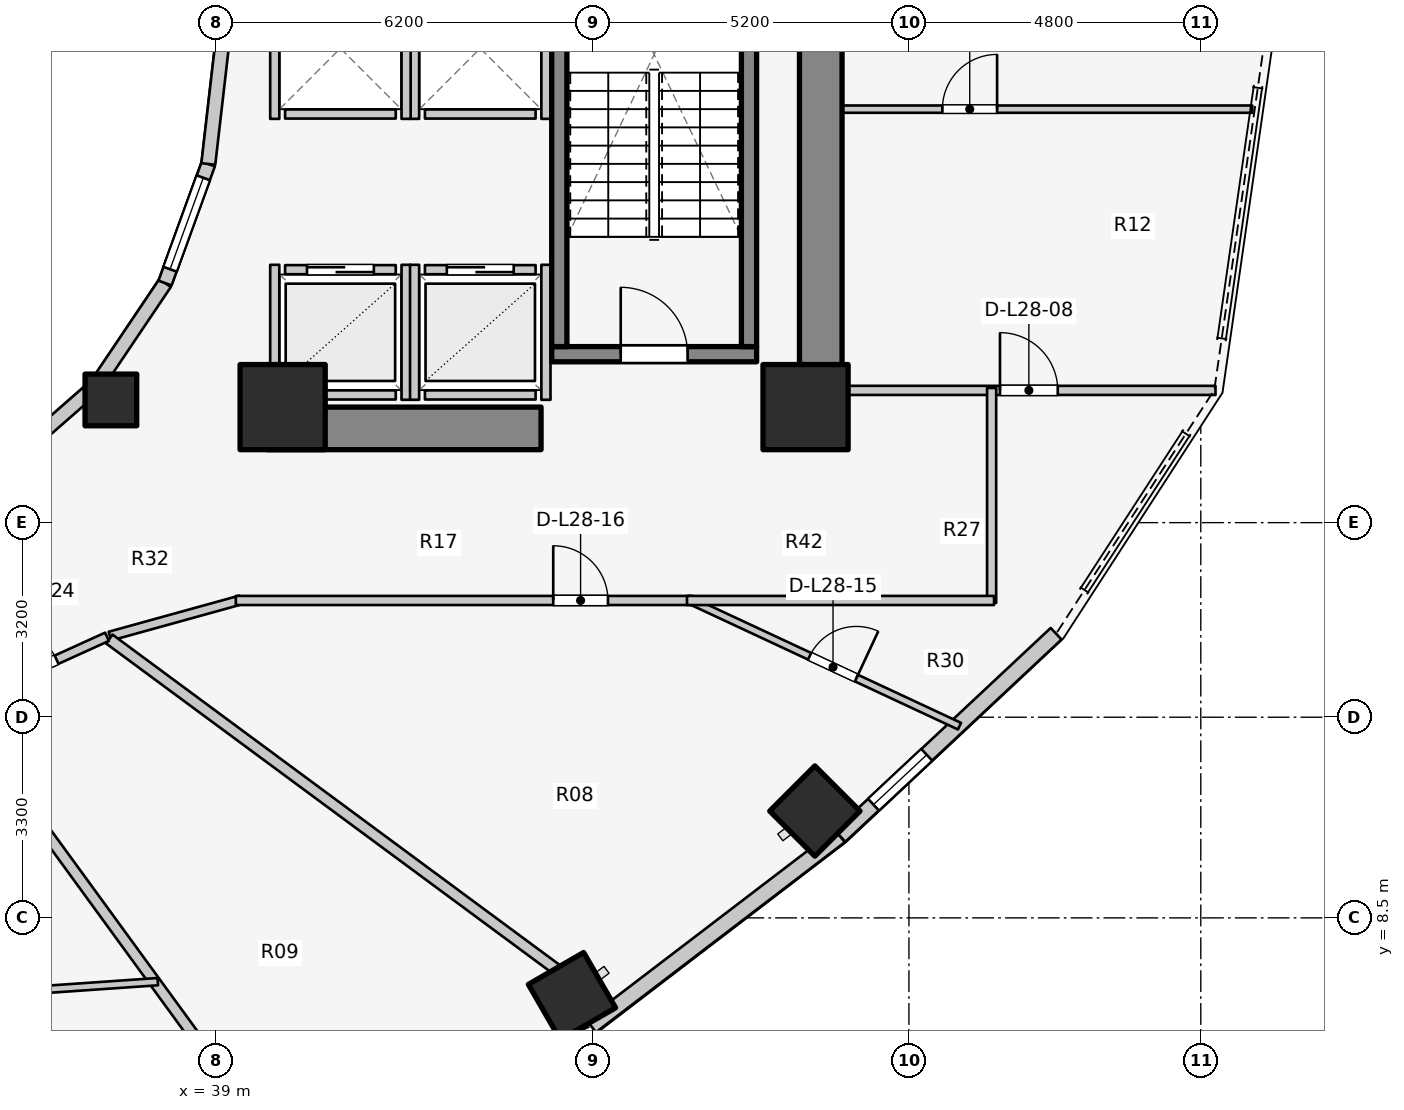
"""IFC4 building model, lengths in metres.
Left out: names, types, materials, properties, quantities, classifications, styles, units other than length and angle.
Written with IfcOpenShell. Run it as: python <this file> out.ifc"""

import sys

from ifc_helpers import new_model, si_unit, direction, frame, frame_2d, origin, origin_2d, place, context, subcontext, project, spatial, rectangle, extrude, element, fill, save


model = new_model("IFC4")
c1 = context("Model", 3, precision=1e-05, world=origin(), true_north=direction((0.0, 1.0)))
c2 = subcontext(c1, "Body", "Model", "MODEL_VIEW")
j1 = project(units=[si_unit("LENGTHUNIT", "METRE"), si_unit("PLANEANGLEUNIT", "RADIAN")], contexts=[c1])
p1 = place(None, origin())
s1 = spatial("IfcSite", under=j1, at=p1, CompositionType="ELEMENT")
p2 = place(p1, origin())
s2 = spatial("IfcBuilding", under=s1, at=p2, CompositionType="ELEMENT")
p3 = place(p2, frame((0.0, 0.0, 94.9)))
s3 = spatial("IfcBuildingStorey", under=s2, at=p3, CompositionType="ELEMENT", Elevation=94.9)
p4 = place(p3, frame((48.95, 17.05, 0.0), z_axis=(0.0, 0.0, 1.0), x_axis=(0.0, 1.0, 0.0)))
e1 = element("IfcWall", 1, at=p4, inside=s3, PredefinedType="SHEAR", context=c2, shape_type="SweptSolid", body=[
    extrude(rectangle(XDim=12.8, YDim=0.7, at=frame_2d((6.4, 0.0))), origin(), (0.0, 0.0, 1.0), 3.1),
])
p5 = place(p3, frame((39.85, 16.55, 0.0), z_axis=(0.0, 0.0, 1.0), x_axis=(1.0, 0.0, 0.0)))
e2 = element("IfcWall", 2, at=p5, inside=s3, PredefinedType="SHEAR", context=c2, shape_type="SweptSolid", body=[
    extrude(rectangle(XDim=4.5, YDim=0.7, at=frame_2d((2.25, 0.0))), origin(), (0.0, 0.0, 1.0), 3.1),
])
p6 = place(p3, frame((44.525, 17.77, 0.0), z_axis=(0.0, 0.0, 1.0), x_axis=(1.0, 0.0, 0.0)))
e3 = element("IfcWall", 3, at=p6, inside=s3, PredefinedType="SOLIDWALL", context=c2, shape_type="SweptSolid", body=[
    extrude(rectangle(XDim=3.37, YDim=0.25, at=frame_2d((1.685, 0.0))), origin(), (0.0, 0.0, 1.0), 3.1),
])
p7 = place(p6, frame((1.135, 0.0, 0.0)))
e4 = element("IfcOpeningElement", 4, at=p7, cuts=e3, PredefinedType="OPENING", context=c2, shape_type="SweptSolid", body=[
    extrude(rectangle(XDim=1.1, YDim=2.1, at=frame_2d((0.55, 1.05))), frame((0.0, 0.135, 0.0), z_axis=(0.0, -1.0, 0.0), x_axis=(1.0, 0.0, 0.0)), (0.0, 0.0, 1.0), 0.27),
])
for number, where, z_axis, x_axis in (
    (5, (44.65, 17.895, 0.0), (0.0, 0.0, 1.0), (0.0, 1.0, 0.0)),
    (6, (47.77, 17.895, 0.0), (0.0, 0.0, 1.0), (0.0, 1.0, 0.0)),
):
    element("IfcWall", number, at=place(p3, frame(where, z_axis=z_axis, x_axis=x_axis)), inside=s3, PredefinedType="SOLIDWALL", context=c2, shape_type="SweptSolid", body=[
        extrude(rectangle(XDim=7.81, YDim=0.25, at=frame_2d((3.905, 0.0))), origin(), (0.0, 0.0, 1.0), 3.1),
    ])
for number, where, z_axis, x_axis in (
    (7, (40.1, 16.9, 0.0), (0.0, 0.0, 1.0), (1.0, 0.0, 0.0)),
    (8, (48.7, 16.9, 0.0), (0.0, 0.0, 1.0), (1.0, 0.0, 0.0)),
):
    element("IfcColumn", number, at=place(p3, frame(where, z_axis=z_axis, x_axis=x_axis)), inside=s3, PredefinedType="COLUMN", context=c2, shape_type="SweptSolid", body=[
        extrude(rectangle(XDim=1.4, YDim=1.4, at=origin_2d()), origin(), (0.0, 0.0, 1.0), 3.1),
    ])
p8 = place(p3, frame((44.858, 7.214, 0.0), z_axis=(0.0, 0.0, 1.0), x_axis=(0.5, -0.866025403784, 0.0)))
e9 = element("IfcColumn", 9, at=p8, inside=s3, PredefinedType="COLUMN", context=c2, shape_type="SweptSolid", body=[
    extrude(rectangle(XDim=1.05, YDim=1.05, at=origin_2d()), origin(), (0.0, 0.0, 1.0), 3.1),
])
p9 = place(p3, frame((37.275, 17.018, 0.0), z_axis=(0.0, 0.0, 1.0), x_axis=(1.0, 0.0, 0.0)))
e10 = element("IfcColumn", 10, at=p9, inside=s3, PredefinedType="COLUMN", context=c2, shape_type="SweptSolid", body=[
    extrude(rectangle(XDim=0.85, YDim=0.85, at=origin_2d()), origin(), (0.0, 0.0, 1.0), 3.1),
])
p10 = place(p3, frame((48.853, 10.257, 0.0), z_axis=(0.0, 0.0, 1.0), x_axis=(0.707106781187, -0.707106781187, 0.0)))
e11 = element("IfcColumn", 11, at=p10, inside=s3, PredefinedType="COLUMN", context=c2, shape_type="SweptSolid", body=[
    extrude(rectangle(XDim=1.05, YDim=1.05, at=origin_2d()), origin(), (0.0, 0.0, 1.0), 3.1),
])
p11 = place(p3, frame((35.56, 15.968, 0.0), z_axis=(0.0, 0.0, 1.0), x_axis=(0.752576694707, 0.658504607869, 0.0)))
e12 = element("IfcWall", 12, at=p11, inside=s3, PredefinedType="STANDARD", context=c2, shape_type="SweptSolid", body=[
    extrude(rectangle(XDim=1.959, YDim=0.23, at=frame_2d((0.98, 0.0))), origin(), (0.0, 0.0, 1.0), 2.16),
])
p12 = place(p3, frame((37.035, 17.258, 0.0), z_axis=(0.0, 0.0, 1.0), x_axis=(0.558197800898, 0.829707909492, 0.0)))
e13 = element("IfcWall", 13, at=p12, inside=s3, PredefinedType="STANDARD", context=c2, shape_type="SweptSolid", body=[
    extrude(rectangle(XDim=2.027, YDim=0.23, at=frame_2d((1.013, 0.0))), origin(), (0.0, 0.0, 1.0), 2.16),
])
p13 = place(p3, frame((38.166, 18.94, 0.0), z_axis=(0.0, 0.0, 1.0), x_axis=(0.341423187295, 0.93990968033, 0.0)))
e14 = element("IfcWall", 14, at=p13, inside=s3, PredefinedType="STANDARD", context=c2, shape_type="SweptSolid", body=[
    extrude(rectangle(XDim=2.084, YDim=0.23, at=frame_2d((1.042, 0.0))), origin(), (0.0, 0.0, 1.0), 2.84),
])
p14 = place(p13, frame((0.242, 0.0, 0.85)))
e15 = element("IfcOpeningElement", 15, at=p14, cuts=e14, PredefinedType="OPENING", context=c2, shape_type="SweptSolid", body=[
    extrude(rectangle(XDim=1.6, YDim=1.65, at=frame_2d((0.8, 0.825))), frame((0.0, 0.125, 0.0), z_axis=(0.0, -1.0, 0.0), x_axis=(1.0, 0.0, 0.0)), (0.0, 0.0, 1.0), 0.25),
])
p15 = place(p3, frame((38.877, 20.898, 0.0), z_axis=(0.0, 0.0, 1.0), x_axis=(0.114711713601, 0.993398823617, 0.0)))
e16 = element("IfcWall", 16, at=p15, inside=s3, PredefinedType="STANDARD", context=c2, shape_type="SweptSolid", body=[
    extrude(rectangle(XDim=2.115, YDim=0.23, at=frame_2d((1.058, 0.0))), origin(), (0.0, 0.0, 1.0), 2.84),
])
p16 = place(p3, frame((45.173, 6.722, 0.0), z_axis=(0.0, 0.0, 1.0), x_axis=(0.794809810864, 0.606858603427, 0.0)))
e17 = element("IfcWall", 17, at=p16, inside=s3, PredefinedType="STANDARD", context=c2, shape_type="SweptSolid", body=[
    extrude(rectangle(XDim=5.149, YDim=0.26, at=frame_2d((2.575, 0.0))), origin(), (0.0, 0.0, 1.0), 2.85),
])
p17 = place(p3, frame((49.266, 9.847, 0.0), z_axis=(0.0, 0.0, 1.0), x_axis=(0.730162452258, 0.68327358599, 0.0)))
e18 = element("IfcWall", 18, at=p17, inside=s3, PredefinedType="STANDARD", context=c2, shape_type="SweptSolid", body=[
    extrude(rectangle(XDim=4.868, YDim=0.26, at=frame_2d((2.434, 0.0))), origin(), (0.0, 0.0, 1.0), 2.85),
])
p18 = place(p17, frame((0.755, 0.0, 0.75)))
e19 = element("IfcOpeningElement", 19, at=p18, cuts=e18, PredefinedType="OPENING", context=c2, shape_type="SweptSolid", body=[
    extrude(rectangle(XDim=1.2, YDim=1.5, at=frame_2d((0.6, 0.75))), frame((0.0, 0.14, 0.0), z_axis=(0.0, -1.0, 0.0), x_axis=(1.0, 0.0, 0.0)), (0.0, 0.0, 1.0), 0.28),
])
p19 = place(p3, frame((40.14, 19.16, 0.0), z_axis=(0.0, 0.0, 1.0), x_axis=(1.0, 0.0, 0.0)))
e20 = element("IfcWall", 20, at=p19, inside=s3, PredefinedType="SOLIDWALL", context=c2, shape_type="SweptSolid", body=[
    extrude(rectangle(XDim=1.82, YDim=0.15, at=frame_2d((0.91, 0.0))), origin(), (0.0, 0.0, 1.0), 2.12),
])
p20 = place(p19, frame((0.36, 0.0, 0.0)))
e21 = element("IfcOpeningElement", 21, at=p20, cuts=e20, PredefinedType="OPENING", context=c2, shape_type="SweptSolid", body=[
    extrude(rectangle(XDim=1.1, YDim=2.1, at=frame_2d((0.55, 1.05))), frame((0.0, 0.085, 0.0), z_axis=(0.0, -1.0, 0.0), x_axis=(1.0, 0.0, 0.0)), (0.0, 0.0, 1.0), 0.17),
])
p21 = place(p3, frame((40.14, 17.1, 0.0), z_axis=(0.0, 0.0, 1.0), x_axis=(1.0, 0.0, 0.0)))
e22 = element("IfcWall", 22, at=p21, inside=s3, PredefinedType="SOLIDWALL", context=c2, shape_type="SweptSolid", body=[
    extrude(rectangle(XDim=1.82, YDim=0.15, at=frame_2d((0.91, 0.0))), origin(), (0.0, 0.0, 1.0), 2.12),
])
p22 = place(p3, frame((39.97, 17.02, 0.0), z_axis=(0.0, 0.0, 1.0), x_axis=(0.0, 1.0, 0.0)))
e23 = element("IfcWall", 23, at=p22, inside=s3, PredefinedType="SOLIDWALL", context=c2, shape_type="SweptSolid", body=[
    extrude(rectangle(XDim=2.22, YDim=0.15, at=frame_2d((1.11, 0.0))), origin(), (0.0, 0.0, 1.0), 2.12),
])
p23 = place(p3, frame((42.13, 17.02, 0.0), z_axis=(0.0, 0.0, 1.0), x_axis=(0.0, 1.0, 0.0)))
e24 = element("IfcWall", 24, at=p23, inside=s3, PredefinedType="SOLIDWALL", context=c2, shape_type="SweptSolid", body=[
    extrude(rectangle(XDim=2.22, YDim=0.15, at=frame_2d((1.11, 0.0))), origin(), (0.0, 0.0, 1.0), 2.855),
])
p24 = place(p3, frame((42.44, 19.16, 0.0), z_axis=(0.0, 0.0, 1.0), x_axis=(1.0, 0.0, 0.0)))
e25 = element("IfcWall", 25, at=p24, inside=s3, PredefinedType="SOLIDWALL", context=c2, shape_type="SweptSolid", body=[
    extrude(rectangle(XDim=1.82, YDim=0.15, at=frame_2d((0.91, 0.0))), origin(), (0.0, 0.0, 1.0), 2.855),
])
p25 = place(p24, frame((0.36, 0.0, 0.0)))
e26 = element("IfcOpeningElement", 26, at=p25, cuts=e25, PredefinedType="OPENING", context=c2, shape_type="SweptSolid", body=[
    extrude(rectangle(XDim=1.1, YDim=2.1, at=frame_2d((0.55, 1.05))), frame((0.0, 0.085, 0.0), z_axis=(0.0, -1.0, 0.0), x_axis=(1.0, 0.0, 0.0)), (0.0, 0.0, 1.0), 0.17),
])
p26 = place(p3, frame((42.44, 17.1, 0.0), z_axis=(0.0, 0.0, 1.0), x_axis=(1.0, 0.0, 0.0)))
e27 = element("IfcWall", 27, at=p26, inside=s3, PredefinedType="SOLIDWALL", context=c2, shape_type="SweptSolid", body=[
    extrude(rectangle(XDim=1.82, YDim=0.15, at=frame_2d((0.91, 0.0))), origin(), (0.0, 0.0, 1.0), 2.855),
])
p27 = place(p3, frame((42.27, 17.02, 0.0), z_axis=(0.0, 0.0, 1.0), x_axis=(0.0, 1.0, 0.0)))
e28 = element("IfcWall", 28, at=p27, inside=s3, PredefinedType="SOLIDWALL", context=c2, shape_type="SweptSolid", body=[
    extrude(rectangle(XDim=2.22, YDim=0.15, at=frame_2d((1.11, 0.0))), origin(), (0.0, 0.0, 1.0), 2.855),
])
p28 = place(p3, frame((44.43, 17.02, 0.0), z_axis=(0.0, 0.0, 1.0), x_axis=(0.0, 1.0, 0.0)))
e29 = element("IfcWall", 29, at=p28, inside=s3, PredefinedType="SOLIDWALL", context=c2, shape_type="SweptSolid", body=[
    extrude(rectangle(XDim=2.22, YDim=0.15, at=frame_2d((1.11, 0.0))), origin(), (0.0, 0.0, 1.0), 2.12),
])
p29 = place(p3, frame((42.44, 21.72, 0.0), z_axis=(0.0, 0.0, 1.0), x_axis=(1.0, 0.0, 0.0)))
e30 = element("IfcWall", 30, at=p29, inside=s3, PredefinedType="SOLIDWALL", context=c2, shape_type="SweptSolid", body=[
    extrude(rectangle(XDim=1.82, YDim=0.15, at=frame_2d((0.91, 0.0))), origin(), (0.0, 0.0, 1.0), 2.855),
])
for number, where, z_axis, x_axis in (
    (31, (42.27, 21.64, 0.0), (0.0, 0.0, 1.0), (0.0, 1.0, 0.0)),
    (32, (44.43, 21.64, 0.0), (0.0, 0.0, 1.0), (0.0, 1.0, 0.0)),
):
    element("IfcWall", number, at=place(p3, frame(where, z_axis=z_axis, x_axis=x_axis)), inside=s3, PredefinedType="SOLIDWALL", context=c2, shape_type="SweptSolid", body=[
        extrude(rectangle(XDim=2.32, YDim=0.15, at=frame_2d((1.16, 0.0))), origin(), (0.0, 0.0, 1.0), 2.855),
    ])
p30 = place(p3, frame((40.14, 21.72, 0.0), z_axis=(0.0, 0.0, 1.0), x_axis=(1.0, 0.0, 0.0)))
e33 = element("IfcWall", 33, at=p30, inside=s3, PredefinedType="SOLIDWALL", context=c2, shape_type="SweptSolid", body=[
    extrude(rectangle(XDim=1.82, YDim=0.15, at=frame_2d((0.91, 0.0))), origin(), (0.0, 0.0, 1.0), 2.12),
])
p31 = place(p3, frame((39.97, 21.64, 0.0), z_axis=(0.0, 0.0, 1.0), x_axis=(0.0, 1.0, 0.0)))
e34 = element("IfcWall", 34, at=p31, inside=s3, PredefinedType="SOLIDWALL", context=c2, shape_type="SweptSolid", body=[
    extrude(rectangle(XDim=2.32, YDim=0.15, at=frame_2d((1.16, 0.0))), origin(), (0.0, 0.0, 1.0), 2.12),
])
p32 = place(p3, frame((42.13, 21.64, 0.0), z_axis=(0.0, 0.0, 1.0), x_axis=(0.0, 1.0, 0.0)))
e35 = element("IfcWall", 35, at=p32, inside=s3, PredefinedType="SOLIDWALL", context=c2, shape_type="SweptSolid", body=[
    extrude(rectangle(XDim=2.32, YDim=0.15, at=frame_2d((1.16, 0.0))), origin(), (0.0, 0.0, 1.0), 2.855),
])
p33 = place(p3, frame((48.95, 17.175, 0.0), z_axis=(0.0, 0.0, 1.0), x_axis=(1.0, 0.0, 0.0)))
e36 = element("IfcWall", 36, at=p33, inside=s3, PredefinedType="PARTITIONING", context=c2, shape_type="SweptSolid", body=[
    extrude(rectangle(XDim=6.492, YDim=0.15, at=frame_2d((3.246, 0.0))), origin(), (0.0, 0.0, 1.0), 2.855),
])
p34 = place(p33, frame((2.948, 0.0, 0.0)))
e37 = element("IfcOpeningElement", 37, at=p34, cuts=e36, PredefinedType="OPENING", context=c2, shape_type="SweptSolid", body=[
    extrude(rectangle(XDim=0.95, YDim=2.1, at=frame_2d((0.475, 1.05))), frame((0.0, 0.085, 0.0), z_axis=(0.0, -1.0, 0.0), x_axis=(1.0, 0.0, 0.0)), (0.0, 0.0, 1.0), 0.17),
])
p35 = place(p3, frame((48.95, 21.8, 0.0), z_axis=(0.0, 0.0, 1.0), x_axis=(1.0, 0.0, 0.0)))
e38 = element("IfcWall", 38, at=p35, inside=s3, PredefinedType="MOVABLE", context=c2, shape_type="SweptSolid", body=[
    extrude(rectangle(XDim=7.097, YDim=0.12, at=frame_2d((3.549, 0.0))), origin(), (0.0, 0.0, 1.0), 2.855),
])
p36 = place(p35, frame((2.0, 0.0, 0.0)))
e39 = element("IfcOpeningElement", 39, at=p36, cuts=e38, PredefinedType="OPENING", context=c2, shape_type="SweptSolid", body=[
    extrude(rectangle(XDim=0.9, YDim=2.1, at=frame_2d((0.45, 1.05))), frame((0.0, 0.07, 0.0), z_axis=(0.0, -1.0, 0.0), x_axis=(1.0, 0.0, 0.0)), (0.0, 0.0, 1.0), 0.14),
])
p37 = place(p3, frame((51.76, 13.68, 0.0), z_axis=(0.0, 0.0, 1.0), x_axis=(0.0, 1.0, 0.0)))
e40 = element("IfcWall", 40, at=p37, inside=s3, PredefinedType="PARTITIONING", context=c2, shape_type="SweptSolid", body=[
    extrude(rectangle(XDim=3.535, YDim=0.15, at=frame_2d((1.768, 0.0))), origin(), (0.0, 0.0, 1.0), 2.855),
])
p38 = place(p3, frame((46.755, 13.741, 0.0), z_axis=(0.0, 0.0, 1.0), x_axis=(0.906244997559, -0.422752888102, 0.0)))
e41 = element("IfcWall", 41, at=p38, inside=s3, PredefinedType="MOVABLE", context=c2, shape_type="SweptSolid", body=[
    extrude(rectangle(XDim=4.94, YDim=0.12, at=frame_2d((2.47, 0.0))), origin(), (0.0, 0.0, 1.0), 2.142),
])
p39 = place(p38, frame((2.22, 0.0, 0.0)))
e42 = element("IfcOpeningElement", 42, at=p39, cuts=e41, PredefinedType="OPENING", context=c2, shape_type="SweptSolid", body=[
    extrude(rectangle(XDim=0.85, YDim=2.05, at=frame_2d((0.425, 1.025))), frame((0.0, 0.07, 0.0), z_axis=(0.0, -1.0, 0.0), x_axis=(1.0, 0.0, 0.0)), (0.0, 0.0, 1.0), 0.14),
])
p40 = place(p3, frame((37.258, 13.133, 0.0), z_axis=(0.0, 0.0, 1.0), x_axis=(0.963833843713, 0.266503886865, 0.0)))
e43 = element("IfcWall", 43, at=p40, inside=s3, PredefinedType="PARTITIONING", context=c2, shape_type="SweptSolid", body=[
    extrude(rectangle(XDim=2.232, YDim=0.15, at=frame_2d((1.116, 0.0))), origin(), (0.0, 0.0, 1.0), 2.272),
])
p41 = place(p3, frame((39.33, 13.72, 0.0), z_axis=(0.0, 0.0, 1.0), x_axis=(1.0, 0.0, 0.0)))
e44 = element("IfcWall", 44, at=p41, inside=s3, PredefinedType="PARTITIONING", context=c2, shape_type="SweptSolid", body=[
    extrude(rectangle(XDim=7.52, YDim=0.15, at=frame_2d((3.76, 0.0))), origin(), (0.0, 0.0, 1.0), 2.272),
])
p42 = place(p41, frame((5.22, 0.0, 0.0)))
e45 = element("IfcOpeningElement", 45, at=p42, cuts=e44, PredefinedType="OPENING", context=c2, shape_type="SweptSolid", body=[
    extrude(rectangle(XDim=0.9, YDim=2.1, at=frame_2d((0.45, 1.05))), frame((0.0, 0.085, 0.0), z_axis=(0.0, -1.0, 0.0), x_axis=(1.0, 0.0, 0.0)), (0.0, 0.0, 1.0), 0.17),
])
p43 = place(p3, frame((46.75, 13.72, 0.0), z_axis=(0.0, 0.0, 1.0), x_axis=(1.0, 0.0, 0.0)))
e46 = element("IfcWall", 46, at=p43, inside=s3, PredefinedType="PARTITIONING", context=c2, shape_type="SweptSolid", body=[
    extrude(rectangle(XDim=5.05, YDim=0.15, at=frame_2d((2.525, 0.0))), origin(), (0.0, 0.0, 1.0), 2.142),
])
p44 = place(p3, frame((34.727, 11.934, 0.0), z_axis=(0.0, 0.0, 1.0), x_axis=(0.589042211476, -0.808102266486, 0.0)))
e47 = element("IfcWall", 47, at=p44, inside=s3, PredefinedType="PARTITIONING", context=c2, shape_type="SweptSolid", body=[
    extrude(rectangle(XDim=8.101, YDim=0.18, at=frame_2d((4.051, 0.0))), origin(), (0.0, 0.0, 1.0), 2.272),
])
p45 = place(p3, frame((37.249, 13.086, 0.0), z_axis=(0.0, 0.0, 1.0), x_axis=(0.80430981394, -0.594210167533, 0.0)))
e48 = element("IfcWall", 48, at=p45, inside=s3, PredefinedType="PARTITIONING", context=c2, shape_type="SweptSolid", body=[
    extrude(rectangle(XDim=9.146, YDim=0.18, at=frame_2d((4.573, 0.0))), origin(), (0.0, 0.0, 1.0), 2.272),
])
p46 = place(p3, frame((31.99, 7.032, 0.0), z_axis=(0.0, 0.0, 1.0), x_axis=(0.997605327057, 0.06916365684, 0.0)))
e49 = element("IfcWall", 49, at=p46, inside=s3, PredefinedType="MOVABLE", context=c2, shape_type="SweptSolid", body=[
    extrude(rectangle(XDim=6.072, YDim=0.12, at=frame_2d((3.036, 0.0))), origin(), (0.0, 0.0, 1.0), 2.272),
])
p47 = place(p3, frame((34.687, 11.977, 0.0), z_axis=(0.0, 0.0, 1.0), x_axis=(0.910568469686, 0.41335827319, 0.0)))
e50 = element("IfcWall", 50, at=p47, inside=s3, PredefinedType="PARTITIONING", context=c2, shape_type="SweptSolid", body=[
    extrude(rectangle(XDim=2.772, YDim=0.15, at=frame_2d((1.386, 0.0))), origin(), (0.0, 0.0, 1.0), 2.272),
])
p48 = place(p47, frame((0.911, 0.0, 0.0)))
e51 = element("IfcOpeningElement", 51, at=p48, cuts=e50, PredefinedType="OPENING", context=c2, shape_type="SweptSolid", body=[
    extrude(rectangle(XDim=0.95, YDim=2.1, at=frame_2d((0.475, 1.05))), frame((0.0, 0.085, 0.0), z_axis=(0.0, -1.0, 0.0), x_axis=(1.0, 0.0, 0.0)), (0.0, 0.0, 1.0), 0.17),
])
p49 = place(p14, origin())
e52 = element("IfcWindow", 52, at=p49, inside=s3, PartitioningType="SINGLE_PANEL", PredefinedType="WINDOW", context=c2, shape_type="SweptSolid", body=[
    extrude(rectangle(XDim=1.6, YDim=1.65, at=frame_2d((0.8, 0.825))), frame((0.0, 0.03, 0.0), z_axis=(0.0, -1.0, 0.0), x_axis=(1.0, 0.0, 0.0)), (0.0, 0.0, 1.0), 0.06),
])
fill(e15, e52)
p50 = place(p18, origin())
e53 = element("IfcWindow", 53, at=p50, inside=s3, PartitioningType="SINGLE_PANEL", PredefinedType="WINDOW", context=c2, shape_type="SweptSolid", body=[
    extrude(rectangle(XDim=1.2, YDim=1.5, at=frame_2d((0.6, 0.75))), frame((0.0, 0.03, 0.0), z_axis=(0.0, -1.0, 0.0), x_axis=(1.0, 0.0, 0.0)), (0.0, 0.0, 1.0), 0.06),
])
fill(e19, e53)
p51 = place(p7, origin())
e54 = element("IfcDoor", 54, at=p51, inside=s3, OperationType="SINGLE_SWING_LEFT", PredefinedType="DOOR", context=c2, shape_type="SweptSolid", body=[
    extrude(rectangle(XDim=1.1, YDim=2.1, at=frame_2d((0.55, 1.05))), frame((0.0, 0.025, 0.0), z_axis=(0.0, -1.0, 0.0), x_axis=(1.0, 0.0, 0.0)), (0.0, 0.0, 1.0), 0.05),
])
fill(e4, e54)
p52 = place(p20, origin())
e55 = element("IfcDoor", 55, at=p52, inside=s3, OperationType="DOUBLE_DOOR_SLIDING", PredefinedType="DOOR", context=c2, shape_type="SweptSolid", body=[
    extrude(rectangle(XDim=1.1, YDim=2.1, at=frame_2d((0.55, 1.05))), frame((0.0, 0.025, 0.0), z_axis=(0.0, -1.0, 0.0), x_axis=(1.0, 0.0, 0.0)), (0.0, 0.0, 1.0), 0.05),
])
fill(e21, e55)
p53 = place(p25, origin())
e56 = element("IfcDoor", 56, at=p53, inside=s3, OperationType="DOUBLE_DOOR_SLIDING", PredefinedType="DOOR", context=c2, shape_type="SweptSolid", body=[
    extrude(rectangle(XDim=1.1, YDim=2.1, at=frame_2d((0.55, 1.05))), frame((0.0, 0.025, 0.0), z_axis=(0.0, -1.0, 0.0), x_axis=(1.0, 0.0, 0.0)), (0.0, 0.0, 1.0), 0.05),
])
fill(e26, e56)
p54 = place(p34, origin())
e57 = element("IfcDoor", 57, at=p54, inside=s3, OperationType="SINGLE_SWING_LEFT", PredefinedType="DOOR", context=c2, shape_type="SweptSolid", body=[
    extrude(rectangle(XDim=0.95, YDim=2.1, at=frame_2d((0.475, 1.05))), frame((0.0, 0.025, 0.0), z_axis=(0.0, -1.0, 0.0), x_axis=(1.0, 0.0, 0.0)), (0.0, 0.0, 1.0), 0.05),
])
fill(e37, e57)
p55 = place(p36, origin())
e58 = element("IfcDoor", 58, at=p55, inside=s3, OperationType="SINGLE_SWING_RIGHT", PredefinedType="DOOR", context=c2, shape_type="SweptSolid", body=[
    extrude(rectangle(XDim=0.9, YDim=2.1, at=frame_2d((0.45, 1.05))), frame((0.0, 0.025, 0.0), z_axis=(0.0, -1.0, 0.0), x_axis=(1.0, 0.0, 0.0)), (0.0, 0.0, 1.0), 0.05),
])
fill(e39, e58)
p56 = place(p39, origin())
e59 = element("IfcDoor", 59, at=p56, inside=s3, OperationType="SINGLE_SWING_RIGHT", PredefinedType="DOOR", context=c2, shape_type="SweptSolid", body=[
    extrude(rectangle(XDim=0.85, YDim=2.05, at=frame_2d((0.425, 1.025))), frame((0.0, 0.025, 0.0), z_axis=(0.0, -1.0, 0.0), x_axis=(1.0, 0.0, 0.0)), (0.0, 0.0, 1.0), 0.05),
])
fill(e42, e59)
p57 = place(p42, origin())
e60 = element("IfcDoor", 60, at=p57, inside=s3, OperationType="SINGLE_SWING_LEFT", PredefinedType="DOOR", context=c2, shape_type="SweptSolid", body=[
    extrude(rectangle(XDim=0.9, YDim=2.1, at=frame_2d((0.45, 1.05))), frame((0.0, 0.025, 0.0), z_axis=(0.0, -1.0, 0.0), x_axis=(1.0, 0.0, 0.0)), (0.0, 0.0, 1.0), 0.05),
])
fill(e45, e60)
p58 = place(p48, origin())
e61 = element("IfcDoor", 61, at=p58, inside=s3, OperationType="SINGLE_SWING_LEFT", PredefinedType="DOOR", context=c2, shape_type="SweptSolid", body=[
    extrude(rectangle(XDim=0.95, YDim=2.1, at=frame_2d((0.475, 1.05))), frame((0.0, 0.025, 0.0), z_axis=(0.0, -1.0, 0.0), x_axis=(1.0, 0.0, 0.0)), (0.0, 0.0, 1.0), 0.05),
])
fill(e51, e61)
save(model, sys.argv[1])
